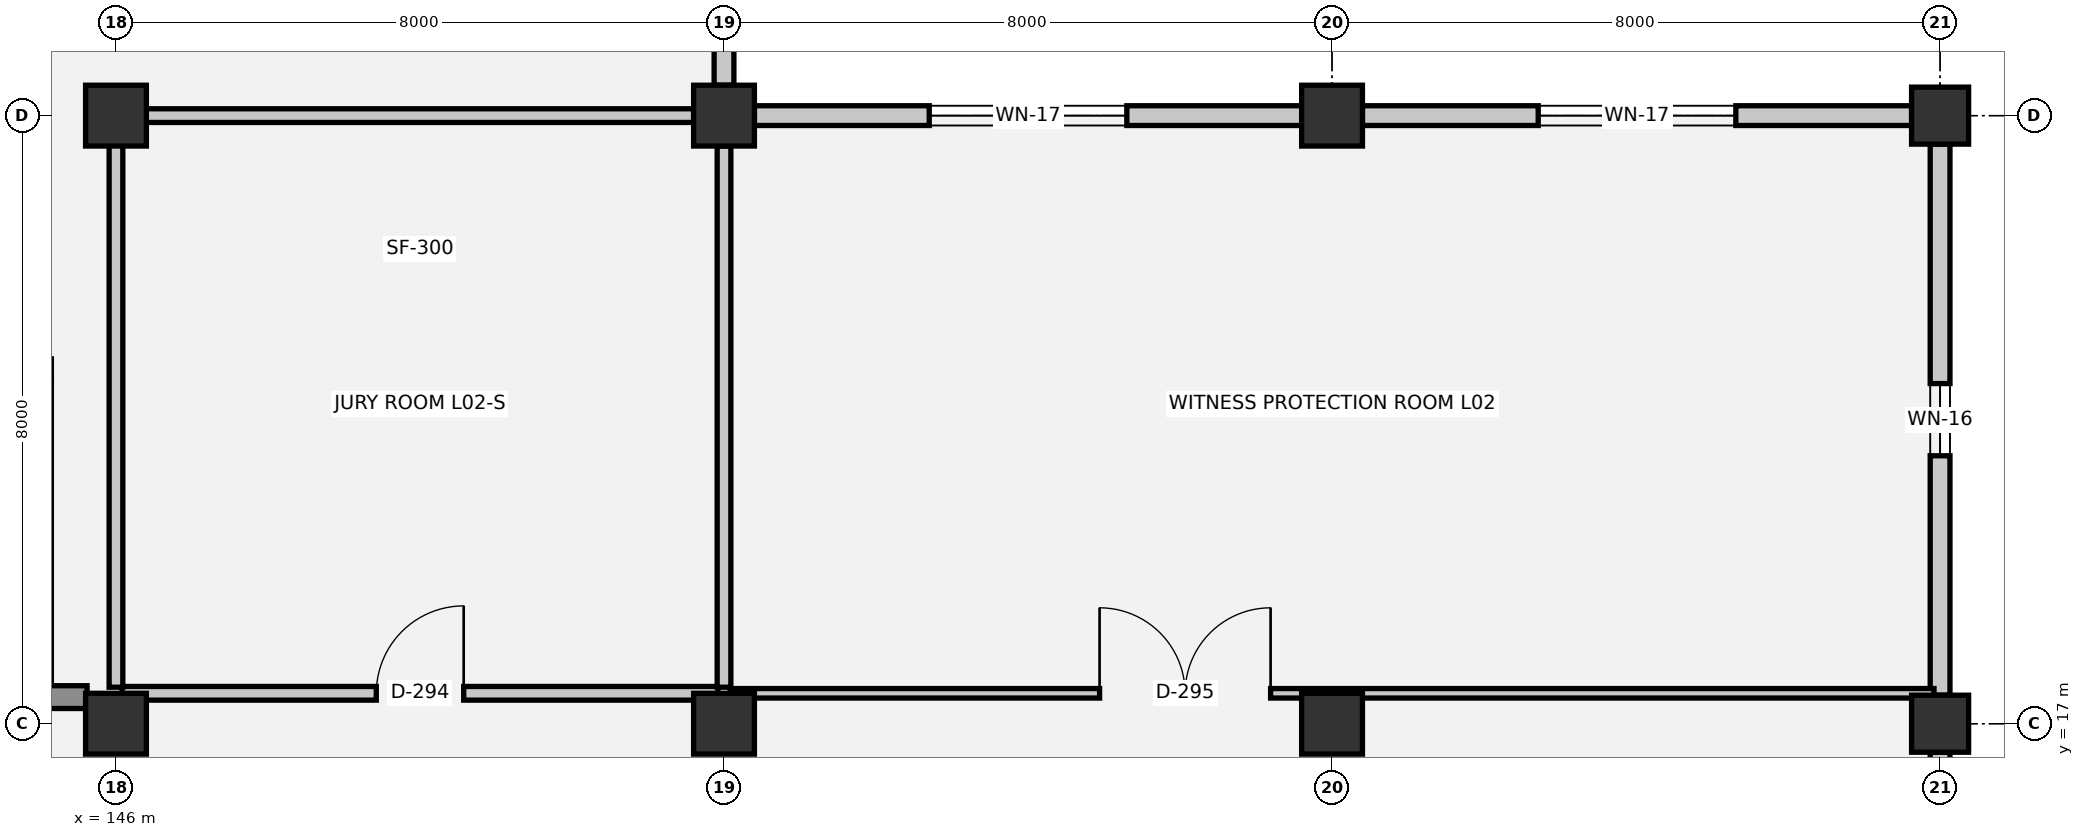
"""IFC4 building model, lengths in metres.
Left out: names, types, materials, properties, quantities, classifications, styles, units other than length and angle.
Written with IfcOpenShell. Run it as: python <this file> out.ifc"""

import sys

from ifc_helpers import new_model, si_unit, direction, frame, frame_2d, origin, origin_2d, place, context, subcontext, project, spatial, rectangle, extrude, element, fill, save


model = new_model("IFC4")
c1 = context("Model", 3, precision=1e-05, world=origin(), true_north=direction((0.0, 1.0)))
c2 = subcontext(c1, "Body", "Model", "MODEL_VIEW")
j1 = project(units=[si_unit("LENGTHUNIT", "METRE"), si_unit("PLANEANGLEUNIT", "RADIAN")], contexts=[c1])
p1 = place(None, origin())
s1 = spatial("IfcSite", under=j1, at=p1, CompositionType="ELEMENT")
p2 = place(p1, origin())
s2 = spatial("IfcBuilding", under=s1, at=p2, CompositionType="ELEMENT")
p3 = place(p2, frame((0.0, 0.0, 5.4)))
s3 = spatial("IfcBuildingStorey", under=s2, at=p3, CompositionType="ELEMENT", Elevation=5.4)
for number, where, z_axis, x_axis in (
    (1, (146.0, 17.0, 0.0), (0.0, 0.0, 1.0), (1.0, 0.0, 0.0)),
    (2, (146.0, 25.0, 0.0), (0.0, 0.0, 1.0), (1.0, 0.0, 0.0)),
    (3, (154.0, 17.0, 0.0), (0.0, 0.0, 1.0), (1.0, 0.0, 0.0)),
    (4, (154.0, 25.0, 0.0), (0.0, 0.0, 1.0), (1.0, 0.0, 0.0)),
    (5, (162.0, 17.0, 0.0), (0.0, 0.0, 1.0), (1.0, 0.0, 0.0)),
    (6, (162.0, 25.0, 0.0), (0.0, 0.0, 1.0), (1.0, 0.0, 0.0)),
):
    element("IfcColumn", number, at=place(p3, frame(where, z_axis=z_axis, x_axis=x_axis)), inside=s3, PredefinedType="COLUMN", context=c2, shape_type="SweptSolid", body=[
        extrude(rectangle(XDim=0.8, YDim=0.8, at=origin_2d()), origin(), (0.0, 0.0, 1.0), 4.5),
    ])
for number, where, z_axis, x_axis in (
    (7, (170.0, 17.0, 0.0), (0.0, 0.0, 1.0), (1.0, 0.0, 0.0)),
    (8, (170.0, 25.0, 0.0), (0.0, 0.0, 1.0), (1.0, 0.0, 0.0)),
):
    element("IfcColumn", number, at=place(p3, frame(where, z_axis=z_axis, x_axis=x_axis)), inside=s3, PredefinedType="COLUMN", context=c2, shape_type="SweptSolid", body=[
        extrude(rectangle(XDim=0.75, YDim=0.75, at=origin_2d()), origin(), (0.0, 0.0, 1.0), 4.5),
    ])
p4 = place(p3, frame((154.0, 31.6, 0.0), z_axis=(0.0, 0.0, 1.0), x_axis=(0.0, -1.0, 0.0)))
e9 = element("IfcWall", 9, at=p4, inside=s3, PredefinedType="SOLIDWALL", context=c2, shape_type="SweptSolid", body=[
    extrude(rectangle(XDim=6.2, YDim=0.26, at=frame_2d((3.1, 0.0))), origin(), (0.0, 0.0, 1.0), 3.23),
])
p5 = place(p4, frame((2.625, 0.0, 1.0)))
e10 = element("IfcOpeningElement", 10, at=p5, cuts=e9, PredefinedType="OPENING", context=c2, shape_type="SweptSolid", body=[
    extrude(rectangle(XDim=0.95, YDim=1.1, at=frame_2d((0.475, 0.55))), frame((0.0, 0.14, 0.0), z_axis=(0.0, -1.0, 0.0), x_axis=(1.0, 0.0, 0.0)), (0.0, 0.0, 1.0), 0.28),
])
p6 = place(p3, frame((154.4, 25.0, 0.0), z_axis=(0.0, 0.0, 1.0), x_axis=(1.0, 0.0, 0.0)))
e11 = element("IfcWall", 11, at=p6, inside=s3, PredefinedType="SOLIDWALL", context=c2, shape_type="SweptSolid", body=[
    extrude(rectangle(XDim=7.2, YDim=0.26, at=frame_2d((3.6, 0.0))), origin(), (0.0, 0.0, 1.0), 3.23),
])
p7 = place(p6, frame((2.3, 0.0, 1.0)))
e12 = element("IfcOpeningElement", 12, at=p7, cuts=e11, PredefinedType="OPENING", context=c2, shape_type="SweptSolid", body=[
    extrude(rectangle(XDim=2.6, YDim=1.1, at=frame_2d((1.3, 0.55))), frame((0.0, 0.14, 0.0), z_axis=(0.0, -1.0, 0.0), x_axis=(1.0, 0.0, 0.0)), (0.0, 0.0, 1.0), 0.28),
])
p8 = place(p3, frame((162.4, 25.0, 0.0), z_axis=(0.0, 0.0, 1.0), x_axis=(1.0, 0.0, 0.0)))
e13 = element("IfcWall", 13, at=p8, inside=s3, PredefinedType="SOLIDWALL", context=c2, shape_type="SweptSolid", body=[
    extrude(rectangle(XDim=7.225, YDim=0.26, at=frame_2d((3.613, 0.0))), origin(), (0.0, 0.0, 1.0), 3.23),
])
p9 = place(p8, frame((2.312, 0.0, 1.0)))
e14 = element("IfcOpeningElement", 14, at=p9, cuts=e13, PredefinedType="OPENING", context=c2, shape_type="SweptSolid", body=[
    extrude(rectangle(XDim=2.6, YDim=1.1, at=frame_2d((1.3, 0.55))), frame((0.0, 0.14, 0.0), z_axis=(0.0, -1.0, 0.0), x_axis=(1.0, 0.0, 0.0)), (0.0, 0.0, 1.0), 0.28),
])
p10 = place(p3, frame((170.0, 24.625, 0.0), z_axis=(0.0, 0.0, 1.0), x_axis=(0.0, -1.0, 0.0)))
e15 = element("IfcWall", 15, at=p10, inside=s3, PredefinedType="SOLIDWALL", context=c2, shape_type="SweptSolid", body=[
    extrude(rectangle(XDim=7.25, YDim=0.26, at=frame_2d((3.625, 0.0))), origin(), (0.0, 0.0, 1.0), 3.23),
])
p11 = place(p10, frame((3.15, 0.0, 1.0)))
e16 = element("IfcOpeningElement", 16, at=p11, cuts=e15, PredefinedType="OPENING", context=c2, shape_type="SweptSolid", body=[
    extrude(rectangle(XDim=0.95, YDim=1.1, at=frame_2d((0.475, 0.55))), frame((0.0, 0.14, 0.0), z_axis=(0.0, -1.0, 0.0), x_axis=(1.0, 0.0, 0.0)), (0.0, 0.0, 1.0), 0.28),
])
p12 = place(p3, frame((170.0, 16.625, 0.0), z_axis=(0.0, 0.0, 1.0), x_axis=(0.0, -1.0, 0.0)))
e17 = element("IfcWall", 17, at=p12, inside=s3, PredefinedType="SOLIDWALL", context=c2, shape_type="SweptSolid", body=[
    extrude(rectangle(XDim=6.25, YDim=0.26, at=frame_2d((3.125, 0.0))), origin(), (0.0, 0.0, 1.0), 3.23),
])
p13 = place(p12, frame((2.65, 0.0, 1.0)))
e18 = element("IfcOpeningElement", 18, at=p13, cuts=e17, PredefinedType="OPENING", context=c2, shape_type="SweptSolid", body=[
    extrude(rectangle(XDim=0.95, YDim=1.1, at=frame_2d((0.475, 0.55))), frame((0.0, 0.14, 0.0), z_axis=(0.0, -1.0, 0.0), x_axis=(1.0, 0.0, 0.0)), (0.0, 0.0, 1.0), 0.28),
])
p14 = place(p3, frame((137.45, 17.35, 0.0), z_axis=(0.0, 0.0, 1.0), x_axis=(1.0, 0.0, 0.0)))
e19 = element("IfcWall", 19, at=p14, inside=s3, PredefinedType="SHEAR", context=c2, shape_type="SweptSolid", body=[
    extrude(rectangle(XDim=8.17, YDim=0.3, at=frame_2d((4.085, 0.0))), origin(), (0.0, 0.0, 1.0), 4.2),
])
p15 = place(p3, frame((146.08, 17.4, 0.0), z_axis=(0.0, 0.0, 1.0), x_axis=(1.0, 0.0, 0.0)))
e20 = element("IfcWall", 20, at=p15, inside=s3, PredefinedType="PARTITIONING", context=c2, shape_type="SweptSolid", body=[
    extrude(rectangle(XDim=7.84, YDim=0.18, at=frame_2d((3.92, 0.0))), origin(), (0.0, 0.0, 1.0), 4.14),
])
p16 = place(p15, frame((3.345, 0.0, 0.0)))
e21 = element("IfcOpeningElement", 21, at=p16, cuts=e20, PredefinedType="OPENING", context=c2, shape_type="SweptSolid", body=[
    extrude(rectangle(XDim=1.15, YDim=2.2, at=frame_2d((0.575, 1.1))), frame((0.0, 0.1, 0.0), z_axis=(0.0, -1.0, 0.0), x_axis=(1.0, 0.0, 0.0)), (0.0, 0.0, 1.0), 0.2),
])
p17 = place(p3, frame((154.08, 17.4, 0.0), z_axis=(0.0, 0.0, 1.0), x_axis=(1.0, 0.0, 0.0)))
e22 = element("IfcWall", 22, at=p17, inside=s3, PredefinedType="PARTITIONING", context=c2, shape_type="SweptSolid", body=[
    extrude(rectangle(XDim=15.84, YDim=0.125, at=frame_2d((7.92, 0.0))), origin(), (0.0, 0.0, 1.0), 4.14),
])
p18 = place(p17, frame((4.862, 0.0, 0.0)))
e23 = element("IfcOpeningElement", 23, at=p18, cuts=e22, PredefinedType="OPENING", context=c2, shape_type="SweptSolid", body=[
    extrude(rectangle(XDim=2.25, YDim=2.4, at=frame_2d((1.125, 1.2))), frame((0.0, 0.073, 0.0), z_axis=(0.0, -1.0, 0.0), x_axis=(1.0, 0.0, 0.0)), (0.0, 0.0, 1.0), 0.145),
])
p19 = place(p3, frame((146.08, 25.0, 0.0), z_axis=(0.0, 0.0, 1.0), x_axis=(1.0, 0.0, 0.0)))
e24 = element("IfcWall", 24, at=p19, inside=s3, PredefinedType="PARTITIONING", context=c2, shape_type="SweptSolid", body=[
    extrude(rectangle(XDim=7.52, YDim=0.18, at=frame_2d((3.76, 0.0))), origin(), (0.0, 0.0, 1.0), 3.45),
])
p20 = place(p3, frame((146.0, 17.48, 0.0), z_axis=(0.0, 0.0, 1.0), x_axis=(0.0, 1.0, 0.0)))
e25 = element("IfcWall", 25, at=p20, inside=s3, PredefinedType="PARTITIONING", context=c2, shape_type="SweptSolid", body=[
    extrude(rectangle(XDim=7.44, YDim=0.18, at=frame_2d((3.72, 0.0))), origin(), (0.0, 0.0, 1.0), 3.3),
])
p21 = place(p3, frame((154.0, 17.48, 0.0), z_axis=(0.0, 0.0, 1.0), x_axis=(0.0, 1.0, 0.0)))
e26 = element("IfcWall", 26, at=p21, inside=s3, PredefinedType="PARTITIONING", context=c2, shape_type="SweptSolid", body=[
    extrude(rectangle(XDim=7.12, YDim=0.18, at=frame_2d((3.56, 0.0))), origin(), (0.0, 0.0, 1.0), 3.3),
])
p22 = place(p7, origin())
e27 = element("IfcWindow", 27, at=p22, inside=s3, PartitioningType="SINGLE_PANEL", PredefinedType="WINDOW", context=c2, shape_type="SweptSolid", body=[
    extrude(rectangle(XDim=2.6, YDim=1.1, at=frame_2d((1.3, 0.55))), frame((0.0, 0.03, 0.0), z_axis=(0.0, -1.0, 0.0), x_axis=(1.0, 0.0, 0.0)), (0.0, 0.0, 1.0), 0.06),
])
fill(e12, e27)
p23 = place(p9, origin())
e28 = element("IfcWindow", 28, at=p23, inside=s3, PartitioningType="SINGLE_PANEL", PredefinedType="WINDOW", context=c2, shape_type="SweptSolid", body=[
    extrude(rectangle(XDim=2.6, YDim=1.1, at=frame_2d((1.3, 0.55))), frame((0.0, 0.03, 0.0), z_axis=(0.0, -1.0, 0.0), x_axis=(1.0, 0.0, 0.0)), (0.0, 0.0, 1.0), 0.06),
])
fill(e14, e28)
p24 = place(p11, origin())
e29 = element("IfcWindow", 29, at=p24, inside=s3, PartitioningType="SINGLE_PANEL", PredefinedType="WINDOW", context=c2, shape_type="SweptSolid", body=[
    extrude(rectangle(XDim=0.95, YDim=1.1, at=frame_2d((0.475, 0.55))), frame((0.0, 0.03, 0.0), z_axis=(0.0, -1.0, 0.0), x_axis=(1.0, 0.0, 0.0)), (0.0, 0.0, 1.0), 0.06),
])
fill(e16, e29)
p25 = place(p16, origin())
e30 = element("IfcDoor", 30, at=p25, inside=s3, OperationType="SINGLE_SWING_RIGHT", PredefinedType="DOOR", context=c2, shape_type="SweptSolid", body=[
    extrude(rectangle(XDim=1.15, YDim=2.2, at=frame_2d((0.575, 1.1))), frame((0.0, 0.025, 0.0), z_axis=(0.0, -1.0, 0.0), x_axis=(1.0, 0.0, 0.0)), (0.0, 0.0, 1.0), 0.05),
])
fill(e21, e30)
p26 = place(p18, origin())
e31 = element("IfcDoor", 31, at=p26, inside=s3, OperationType="DOUBLE_DOOR_SINGLE_SWING", PredefinedType="DOOR", context=c2, shape_type="SweptSolid", body=[
    extrude(rectangle(XDim=2.25, YDim=2.4, at=frame_2d((1.125, 1.2))), frame((0.0, 0.025, 0.0), z_axis=(0.0, -1.0, 0.0), x_axis=(1.0, 0.0, 0.0)), (0.0, 0.0, 1.0), 0.05),
])
fill(e23, e31)
save(model, sys.argv[1])
